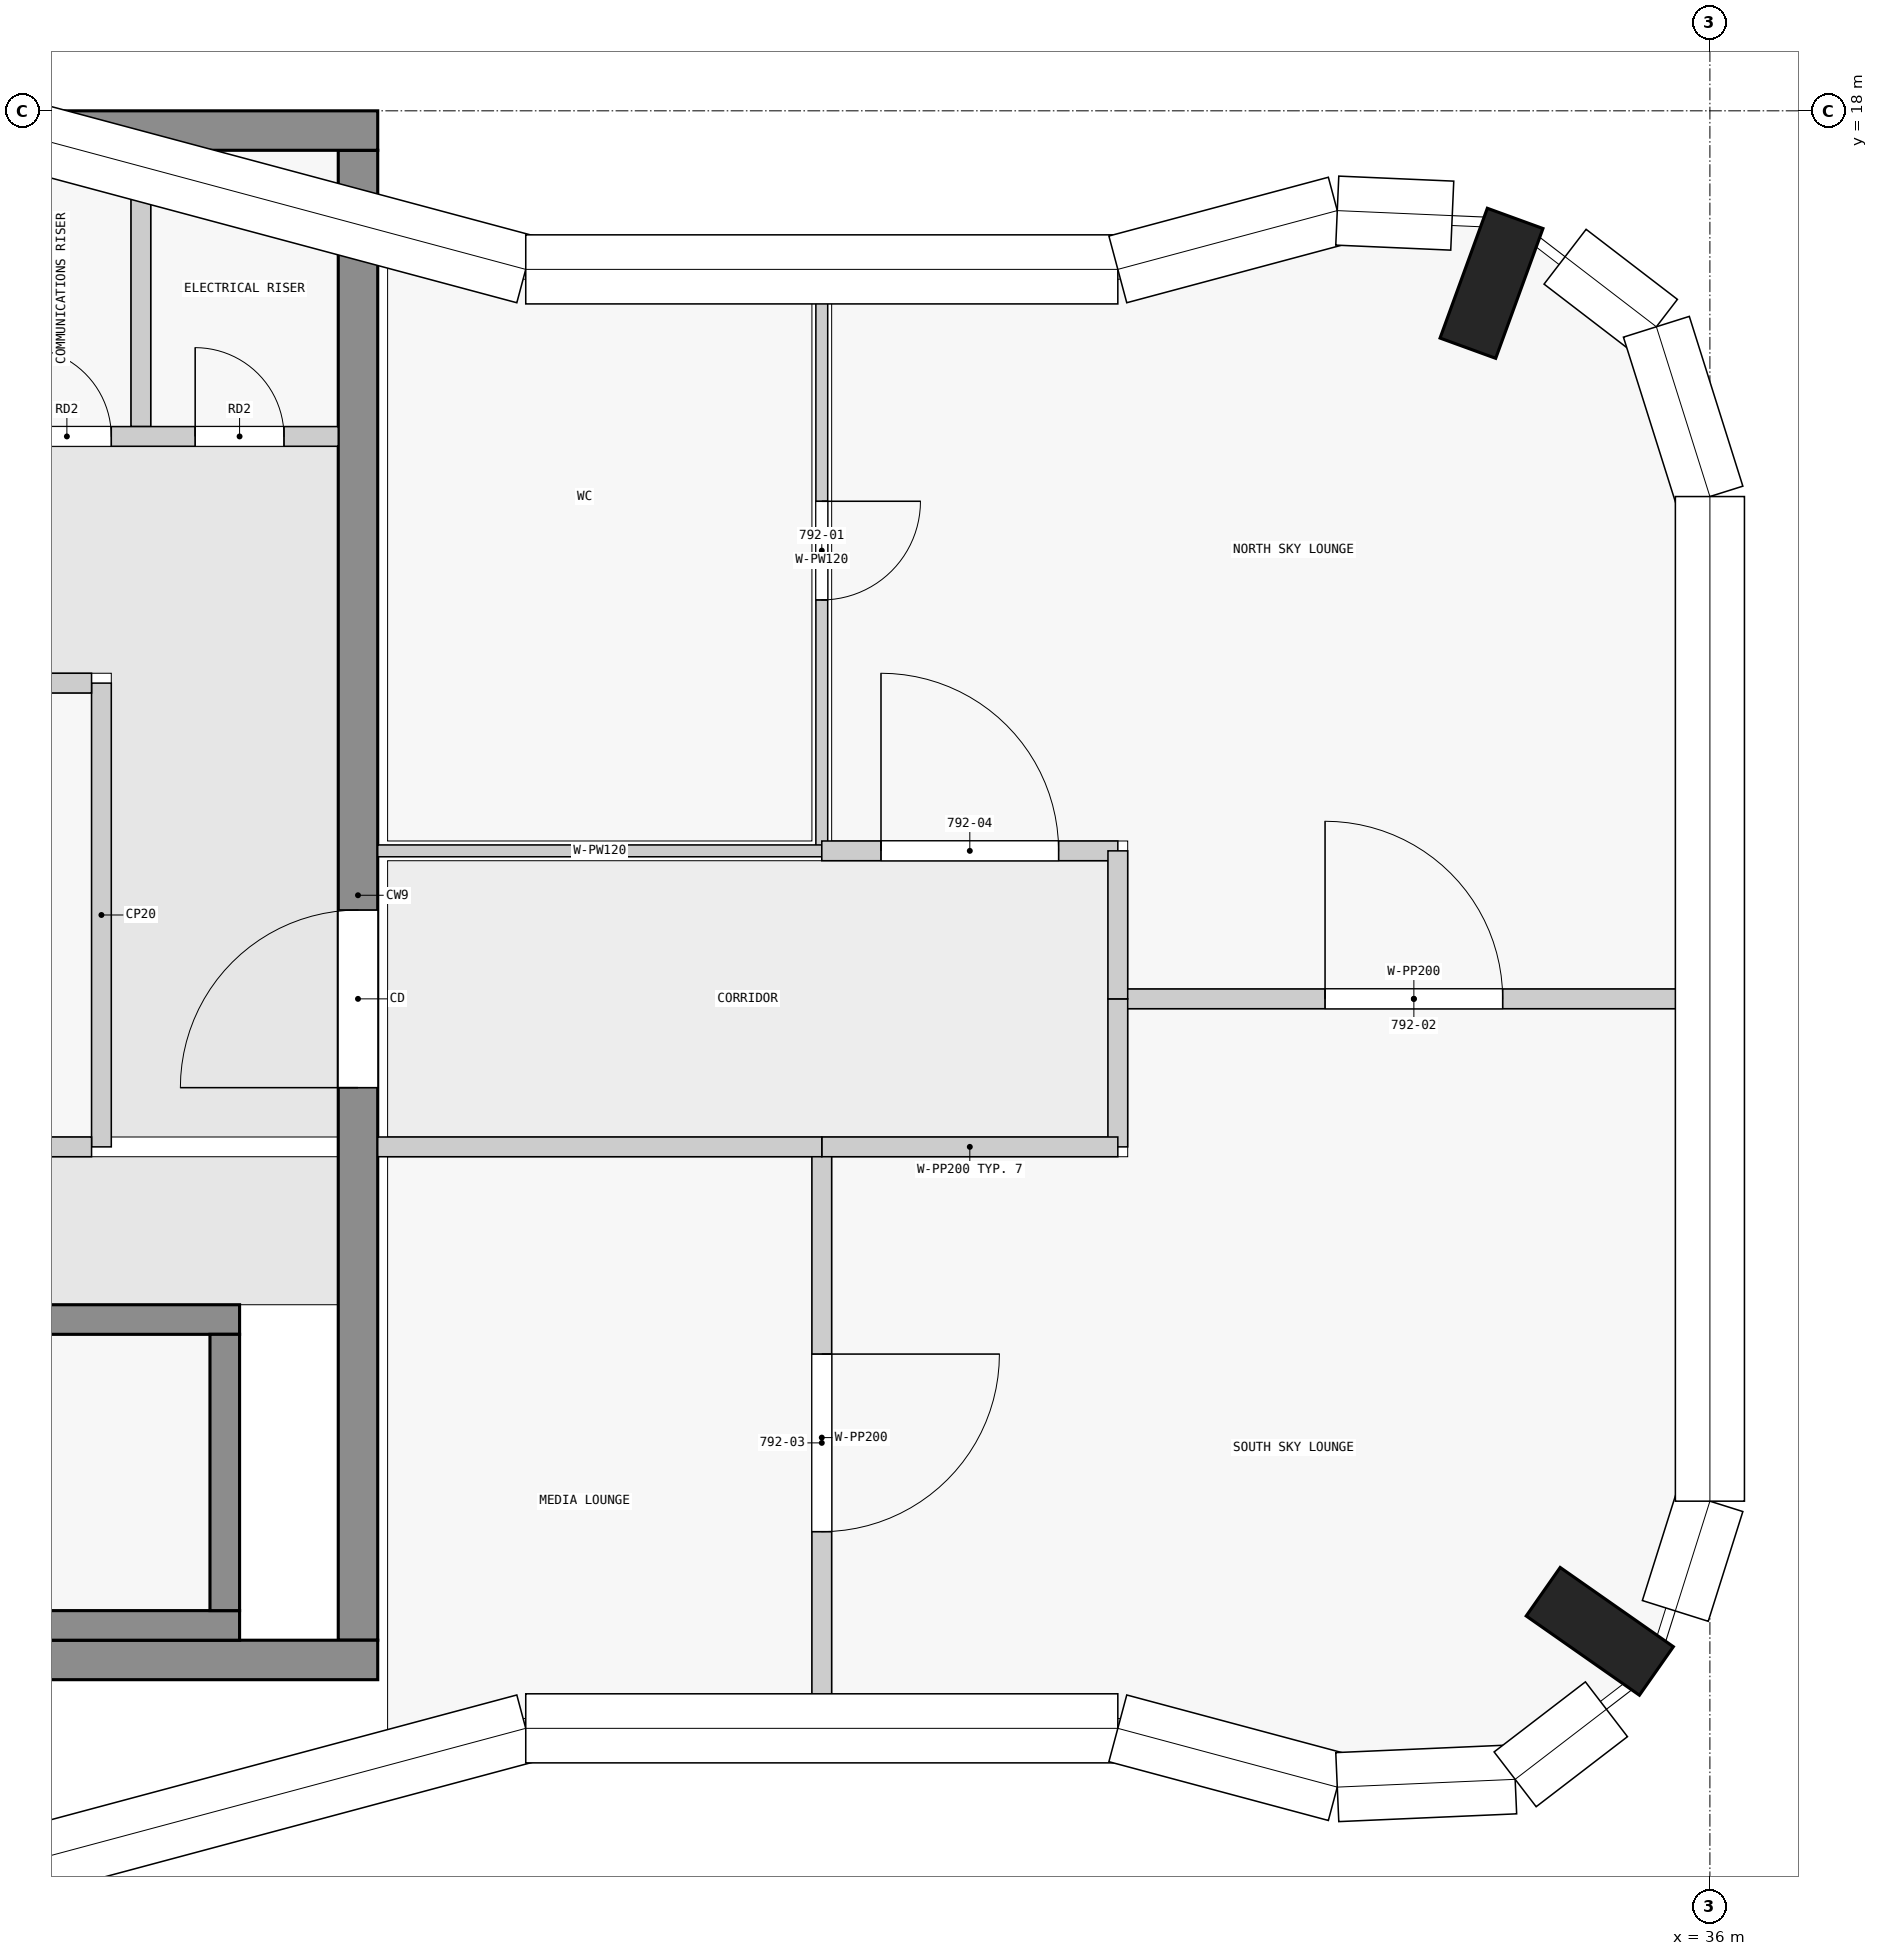
"""IFC4 building model, lengths in metres.
Left out: names, types, materials, properties, quantities, classifications, styles, units other than length and angle.
Written with IfcOpenShell. Run it as: python <this file> out.ifc"""

import sys

from ifc_helpers import new_model, si_unit, direction, frame, frame_2d, origin, origin_2d, place, context, subcontext, project, spatial, rectangle, extrude, element, fill, save


model = new_model("IFC4")
c1 = context("Model", 3, precision=1e-05, world=origin(), true_north=direction((0.0, 1.0)))
c2 = subcontext(c1, "Body", "Model", "MODEL_VIEW")
j1 = project(units=[si_unit("LENGTHUNIT", "METRE"), si_unit("PLANEANGLEUNIT", "RADIAN")], contexts=[c1])
p1 = place(None, origin())
s1 = spatial("IfcSite", under=j1, at=p1, CompositionType="ELEMENT")
p2 = place(p1, origin())
s2 = spatial("IfcBuilding", under=s1, at=p2, CompositionType="ELEMENT")
p3 = place(p2, frame((0.0, 0.0, 298.4)))
s3 = spatial("IfcBuildingStorey", under=s2, at=p3, CompositionType="ELEMENT", Elevation=298.4)
for number, where, z_axis, x_axis in (
    (1, (34.884, 2.59, 0.0), (0.0, 0.0, 1.0), (0.574, 0.819, 0.0)),
    (2, (33.787, 16.252, 0.0), (0.0, 0.0, 1.0), (-0.94, 0.342, 0.0)),
):
    element("IfcColumn", number, at=place(p3, frame(where, z_axis=z_axis, x_axis=x_axis)), inside=s3, PredefinedType="COLUMN", context=c2, shape_type="SweptSolid", body=[
        extrude(rectangle(XDim=0.6, YDim=1.4, at=origin_2d()), origin(), (0.0, 0.0, 1.0), 3.5),
    ])
for number, where, z_axis, x_axis in (
    (3, (1.9, 2.3, 0.0), (0.0, 0.0, 1.0), (1.0, 0.0, 0.0)),
    (4, (1.9, 17.8, 0.0), (0.0, 0.0, 1.0), (1.0, 0.0, 0.0)),
):
    element("IfcWall", number, at=place(p3, frame(where, z_axis=z_axis, x_axis=x_axis)), inside=s3, PredefinedType="SHEAR", context=c2, shape_type="SweptSolid", body=[
        extrude(rectangle(XDim=20.6, YDim=0.4, at=frame_2d((10.3, 0.0))), origin(), (0.0, 0.0, 1.0), 3.05),
    ])
p4 = place(p3, frame((22.3, 2.5, 0.0), z_axis=(0.0, 0.0, 1.0), x_axis=(0.0, 1.0, 0.0)))
e5 = element("IfcWall", 5, at=p4, inside=s3, PredefinedType="SHEAR", context=c2, shape_type="SweptSolid", body=[
    extrude(rectangle(XDim=15.1, YDim=0.4, at=frame_2d((7.55, 0.0))), origin(), (0.0, 0.0, 1.0), 3.05),
])
p5 = place(p4, frame((5.6, 0.0, 0.0)))
e6 = element("IfcOpeningElement", 6, at=p5, cuts=e5, PredefinedType="OPENING", context=c2, shape_type="SweptSolid", body=[
    extrude(rectangle(XDim=1.8, YDim=2.1, at=frame_2d((0.9, 1.05))), frame((0.0, 0.21, 0.0), z_axis=(0.0, -1.0, 0.0), x_axis=(1.0, 0.0, 0.0)), (0.0, 0.0, 1.0), 0.42),
])
p6 = place(p3, frame((13.3, 2.65, 0.0), z_axis=(0.0, 0.0, 1.0), x_axis=(1.0, 0.0, 0.0)))
e7 = element("IfcWall", 7, at=p6, inside=s3, PredefinedType="SHEAR", context=c2, shape_type="SweptSolid", body=[
    extrude(rectangle(XDim=7.8, YDim=0.3, at=frame_2d((3.9, 0.0))), origin(), (0.0, 0.0, 1.0), 3.05),
])
p7 = place(p3, frame((20.95, 2.8, 0.0), z_axis=(0.0, 0.0, 1.0), x_axis=(0.0, 1.0, 0.0)))
e8 = element("IfcWall", 8, at=p7, inside=s3, PredefinedType="SHEAR", context=c2, shape_type="SweptSolid", body=[
    extrude(rectangle(XDim=2.8, YDim=0.3, at=frame_2d((1.4, 0.0))), origin(), (0.0, 0.0, 1.0), 3.05),
])
p8 = place(p3, frame((2.3, 5.75, 0.0), z_axis=(0.0, 0.0, 1.0), x_axis=(1.0, 0.0, 0.0)))
e9 = element("IfcWall", 9, at=p8, inside=s3, PredefinedType="SHEAR", context=c2, shape_type="SweptSolid", body=[
    extrude(rectangle(XDim=18.8, YDim=0.3, at=frame_2d((9.4, 0.0))), origin(), (0.0, 0.0, 1.0), 3.05),
])
p9 = place(p8, frame((4.65, 0.0, 0.0)))
e10 = element("IfcOpeningElement", 10, at=p9, cuts=e9, PredefinedType="OPENING", context=c2, shape_type="SweptSolid", body=[
    extrude(rectangle(XDim=1.1, YDim=2.1, at=frame_2d((0.55, 1.05))), frame((0.0, 0.16, 0.0), z_axis=(0.0, -1.0, 0.0), x_axis=(1.0, 0.0, 0.0)), (0.0, 0.0, 1.0), 0.32),
])
p10 = place(p8, frame((0.45, 0.0, 0.0)))
e11 = element("IfcOpeningElement", 11, at=p10, cuts=e9, PredefinedType="OPENING", context=c2, shape_type="SweptSolid", body=[
    extrude(rectangle(XDim=1.1, YDim=2.1, at=frame_2d((0.55, 1.05))), frame((0.0, 0.16, 0.0), z_axis=(0.0, -1.0, 0.0), x_axis=(1.0, 0.0, 0.0)), (0.0, 0.0, 1.0), 0.32),
])
p11 = place(p8, frame((2.75, 0.0, 0.0)))
e12 = element("IfcOpeningElement", 12, at=p11, cuts=e9, PredefinedType="OPENING", context=c2, shape_type="SweptSolid", body=[
    extrude(rectangle(XDim=1.1, YDim=2.1, at=frame_2d((0.55, 1.05))), frame((0.0, 0.16, 0.0), z_axis=(0.0, -1.0, 0.0), x_axis=(1.0, 0.0, 0.0)), (0.0, 0.0, 1.0), 0.32),
])
p12 = place(p8, frame((11.95, 0.0, 0.0)))
e13 = element("IfcOpeningElement", 13, at=p12, cuts=e9, PredefinedType="OPENING", context=c2, shape_type="SweptSolid", body=[
    extrude(rectangle(XDim=0.9, YDim=2.1, at=frame_2d((0.45, 1.05))), frame((0.0, 0.16, 0.0), z_axis=(0.0, -1.0, 0.0), x_axis=(1.0, 0.0, 0.0)), (0.0, 0.0, 1.0), 0.32),
])
p13 = place(p8, frame((15.7, 0.0, 0.0)))
e14 = element("IfcOpeningElement", 14, at=p13, cuts=e9, PredefinedType="OPENING", context=c2, shape_type="SweptSolid", body=[
    extrude(rectangle(XDim=0.9, YDim=2.1, at=frame_2d((0.45, 1.05))), frame((0.0, 0.16, 0.0), z_axis=(0.0, -1.0, 0.0), x_axis=(1.0, 0.0, 0.0)), (0.0, 0.0, 1.0), 0.32),
])
p14 = place(p3, frame((10.9, 7.5, 0.0), z_axis=(0.0, 0.0, 1.0), x_axis=(1.0, 0.0, 0.0)))
e15 = element("IfcWall", 15, at=p14, inside=s3, PredefinedType="PARTITIONING", context=c2, shape_type="SweptSolid", body=[
    extrude(rectangle(XDim=8.7, YDim=0.2, at=frame_2d((4.35, 0.0))), origin(), (0.0, 0.0, 1.0), 3.05),
])
p15 = place(p3, frame((19.7, 7.5, 0.0), z_axis=(0.0, 0.0, 1.0), x_axis=(0.0, 1.0, 0.0)))
e16 = element("IfcWall", 16, at=p15, inside=s3, PredefinedType="PARTITIONING", context=c2, shape_type="SweptSolid", body=[
    extrude(rectangle(XDim=4.7, YDim=0.2, at=frame_2d((2.35, 0.0))), origin(), (0.0, 0.0, 1.0), 3.05),
])
p16 = place(p3, frame((10.9, 12.2, 0.0), z_axis=(0.0, 0.0, 1.0), x_axis=(1.0, 0.0, 0.0)))
e17 = element("IfcWall", 17, at=p16, inside=s3, PredefinedType="PARTITIONING", context=c2, shape_type="SweptSolid", body=[
    extrude(rectangle(XDim=8.7, YDim=0.2, at=frame_2d((4.35, 0.0))), origin(), (0.0, 0.0, 1.0), 3.05),
])
p17 = place(p16, frame((1.45, 0.0, 0.0)))
e18 = element("IfcOpeningElement", 18, at=p17, cuts=e17, PredefinedType="OPENING", context=c2, shape_type="SweptSolid", body=[
    extrude(rectangle(XDim=0.9, YDim=2.1, at=frame_2d((0.45, 1.05))), frame((0.0, 0.11, 0.0), z_axis=(0.0, -1.0, 0.0), x_axis=(1.0, 0.0, 0.0)), (0.0, 0.0, 1.0), 0.22),
])
p18 = place(p16, frame((5.9, 0.0, 0.0)))
e19 = element("IfcOpeningElement", 19, at=p18, cuts=e17, PredefinedType="OPENING", context=c2, shape_type="SweptSolid", body=[
    extrude(rectangle(XDim=0.9, YDim=2.1, at=frame_2d((0.45, 1.05))), frame((0.0, 0.11, 0.0), z_axis=(0.0, -1.0, 0.0), x_axis=(1.0, 0.0, 0.0)), (0.0, 0.0, 1.0), 0.22),
])
p19 = place(p3, frame((18.6, 14.7, 0.0), z_axis=(0.0, 0.0, 1.0), x_axis=(1.0, 0.0, 0.0)))
e20 = element("IfcWall", 20, at=p19, inside=s3, PredefinedType="PARTITIONING", context=c2, shape_type="SweptSolid", body=[
    extrude(rectangle(XDim=3.5, YDim=0.2, at=frame_2d((1.75, 0.0))), origin(), (0.0, 0.0, 1.0), 3.05),
])
p20 = place(p19, frame((0.3, 0.0, 0.0)))
e21 = element("IfcOpeningElement", 21, at=p20, cuts=e20, PredefinedType="OPENING", context=c2, shape_type="SweptSolid", body=[
    extrude(rectangle(XDim=0.9, YDim=2.1, at=frame_2d((0.45, 1.05))), frame((0.0, 0.11, 0.0), z_axis=(0.0, -1.0, 0.0), x_axis=(1.0, 0.0, 0.0)), (0.0, 0.0, 1.0), 0.22),
])
p21 = place(p19, frame((2.05, 0.0, 0.0)))
e22 = element("IfcOpeningElement", 22, at=p21, cuts=e20, PredefinedType="OPENING", context=c2, shape_type="SweptSolid", body=[
    extrude(rectangle(XDim=0.9, YDim=2.1, at=frame_2d((0.45, 1.05))), frame((0.0, 0.11, 0.0), z_axis=(0.0, -1.0, 0.0), x_axis=(1.0, 0.0, 0.0)), (0.0, 0.0, 1.0), 0.22),
])
p22 = place(p3, frame((20.1, 14.8, 0.0), z_axis=(0.0, 0.0, 1.0), x_axis=(0.0, 1.0, 0.0)))
e23 = element("IfcWall", 23, at=p22, inside=s3, PredefinedType="PARTITIONING", context=c2, shape_type="SweptSolid", body=[
    extrude(rectangle(XDim=2.8, YDim=0.2, at=frame_2d((1.4, 0.0))), origin(), (0.0, 0.0, 1.0), 3.05),
])
p23 = place(p3, frame((30.0, 9.0, 0.0), z_axis=(0.0, 0.0, 1.0), x_axis=(1.0, 0.0, 0.0)))
e24 = element("IfcWall", 24, at=p23, inside=s3, PredefinedType="PARTITIONING", context=c2, shape_type="SweptSolid", body=[
    extrude(rectangle(XDim=6.0, YDim=0.2, at=frame_2d((3.0, 0.0))), origin(), (0.0, 0.0, 1.0), 3.05),
])
p24 = place(p23, frame((2.1, 0.0, 0.0)))
e25 = element("IfcOpeningElement", 25, at=p24, cuts=e24, PredefinedType="OPENING", context=c2, shape_type="SweptSolid", body=[
    extrude(rectangle(XDim=1.8, YDim=2.1, at=frame_2d((0.9, 1.05))), frame((0.0, 0.11, 0.0), z_axis=(0.0, -1.0, 0.0), x_axis=(1.0, 0.0, 0.0)), (0.0, 0.0, 1.0), 0.22),
])
p25 = place(p3, frame((27.0, 16.393, 0.0), z_axis=(0.0, 0.0, 1.0), x_axis=(0.0, -1.0, 0.0)))
e26 = element("IfcWall", 26, at=p25, inside=s3, PredefinedType="PARTITIONING", context=c2, shape_type="SweptSolid", body=[
    extrude(rectangle(XDim=5.893, YDim=0.12, at=frame_2d((2.947, 0.0))), origin(), (0.0, 0.0, 1.0), 3.05),
])
p26 = place(p25, frame((2.35, 0.0, 0.0)))
e27 = element("IfcOpeningElement", 27, at=p26, cuts=e26, PredefinedType="OPENING", context=c2, shape_type="SweptSolid", body=[
    extrude(rectangle(XDim=1.0, YDim=2.1, at=frame_2d((0.5, 1.05))), frame((0.0, 0.07, 0.0), z_axis=(0.0, -1.0, 0.0), x_axis=(1.0, 0.0, 0.0)), (0.0, 0.0, 1.0), 0.14),
])
p27 = place(p3, frame((27.0, 7.5, 0.0), z_axis=(0.0, 0.0, 1.0), x_axis=(0.0, -1.0, 0.0)))
e28 = element("IfcWall", 28, at=p27, inside=s3, PredefinedType="PARTITIONING", context=c2, shape_type="SweptSolid", body=[
    extrude(rectangle(XDim=5.893, YDim=0.2, at=frame_2d((2.947, 0.0))), origin(), (0.0, 0.0, 1.0), 3.05),
])
p28 = place(p27, frame((2.1, 0.0, 0.0)))
e29 = element("IfcOpeningElement", 29, at=p28, cuts=e28, PredefinedType="OPENING", context=c2, shape_type="SweptSolid", body=[
    extrude(rectangle(XDim=1.8, YDim=2.1, at=frame_2d((0.9, 1.05))), frame((0.0, 0.11, 0.0), z_axis=(0.0, -1.0, 0.0), x_axis=(1.0, 0.0, 0.0)), (0.0, 0.0, 1.0), 0.22),
])
p29 = place(p3, frame((30.0, 9.0, 0.0), z_axis=(0.0, 0.0, 1.0), x_axis=(0.0, -1.0, 0.0)))
e30 = element("IfcWall", 30, at=p29, inside=s3, PredefinedType="PARTITIONING", context=c2, shape_type="SweptSolid", body=[
    extrude(rectangle(XDim=1.5, YDim=0.2, at=frame_2d((0.75, 0.0))), origin(), (0.0, 0.0, 1.0), 3.05),
])
p30 = place(p3, frame((30.0, 7.5, 0.0), z_axis=(0.0, 0.0, 1.0), x_axis=(-1.0, 0.0, 0.0)))
e31 = element("IfcWall", 31, at=p30, inside=s3, PredefinedType="PARTITIONING", context=c2, shape_type="SweptSolid", body=[
    extrude(rectangle(XDim=3.0, YDim=0.2, at=frame_2d((1.5, 0.0))), origin(), (0.0, 0.0, 1.0), 3.05),
])
p31 = place(p3, frame((22.5, 10.5, 0.0), z_axis=(0.0, 0.0, 1.0), x_axis=(1.0, 0.0, 0.0)))
e32 = element("IfcWall", 32, at=p31, inside=s3, PredefinedType="PARTITIONING", context=c2, shape_type="SweptSolid", body=[
    extrude(rectangle(XDim=4.5, YDim=0.12, at=frame_2d((2.25, 0.0))), origin(), (0.0, 0.0, 1.0), 3.05),
])
p32 = place(p3, frame((27.0, 7.5, 0.0), z_axis=(0.0, 0.0, 1.0), x_axis=(-1.0, 0.0, 0.0)))
e33 = element("IfcWall", 33, at=p32, inside=s3, PredefinedType="PARTITIONING", context=c2, shape_type="SweptSolid", body=[
    extrude(rectangle(XDim=4.5, YDim=0.2, at=frame_2d((2.25, 0.0))), origin(), (0.0, 0.0, 1.0), 3.05),
])
p33 = place(p3, frame((27.0, 10.5, 0.0), z_axis=(0.0, 0.0, 1.0), x_axis=(1.0, 0.0, 0.0)))
e34 = element("IfcWall", 34, at=p33, inside=s3, PredefinedType="PARTITIONING", context=c2, shape_type="SweptSolid", body=[
    extrude(rectangle(XDim=3.0, YDim=0.2, at=frame_2d((1.5, 0.0))), origin(), (0.0, 0.0, 1.0), 3.05),
])
p34 = place(p33, frame((0.6, 0.0, 0.0)))
e35 = element("IfcOpeningElement", 35, at=p34, cuts=e34, PredefinedType="OPENING", context=c2, shape_type="SweptSolid", body=[
    extrude(rectangle(XDim=1.8, YDim=2.1, at=frame_2d((0.9, 1.05))), frame((0.0, 0.11, 0.0), z_axis=(0.0, -1.0, 0.0), x_axis=(1.0, 0.0, 0.0)), (0.0, 0.0, 1.0), 0.22),
])
p35 = place(p3, frame((30.0, 10.5, 0.0), z_axis=(0.0, 0.0, 1.0), x_axis=(0.0, -1.0, 0.0)))
e36 = element("IfcWall", 36, at=p35, inside=s3, PredefinedType="PARTITIONING", context=c2, shape_type="SweptSolid", body=[
    extrude(rectangle(XDim=1.5, YDim=0.2, at=frame_2d((0.75, 0.0))), origin(), (0.0, 0.0, 1.0), 3.05),
])
p36 = place(p5, origin())
e37 = element("IfcDoor", 37, at=p36, inside=s3, OperationType="DOUBLE_DOOR_SINGLE_SWING", PredefinedType="DOOR", context=c2, shape_type="SweptSolid", body=[
    extrude(rectangle(XDim=1.8, YDim=2.1, at=frame_2d((0.9, 1.05))), frame((0.0, 0.025, 0.0), z_axis=(0.0, -1.0, 0.0), x_axis=(1.0, 0.0, 0.0)), (0.0, 0.0, 1.0), 0.05),
])
fill(e6, e37)
p37 = place(p20, origin())
e38 = element("IfcDoor", 38, at=p37, inside=s3, OperationType="SINGLE_SWING_LEFT", PredefinedType="DOOR", context=c2, shape_type="SweptSolid", body=[
    extrude(rectangle(XDim=0.9, YDim=2.1, at=frame_2d((0.45, 1.05))), frame((0.0, 0.025, 0.0), z_axis=(0.0, -1.0, 0.0), x_axis=(1.0, 0.0, 0.0)), (0.0, 0.0, 1.0), 0.05),
])
fill(e21, e38)
p38 = place(p21, origin())
e39 = element("IfcDoor", 39, at=p38, inside=s3, OperationType="SINGLE_SWING_LEFT", PredefinedType="DOOR", context=c2, shape_type="SweptSolid", body=[
    extrude(rectangle(XDim=0.9, YDim=2.1, at=frame_2d((0.45, 1.05))), frame((0.0, 0.025, 0.0), z_axis=(0.0, -1.0, 0.0), x_axis=(1.0, 0.0, 0.0)), (0.0, 0.0, 1.0), 0.05),
])
fill(e22, e39)
p39 = place(p26, origin())
e40 = element("IfcDoor", 40, at=p39, inside=s3, OperationType="SINGLE_SWING_LEFT", PredefinedType="DOOR", context=c2, shape_type="SweptSolid", body=[
    extrude(rectangle(XDim=1.0, YDim=2.1, at=frame_2d((0.5, 1.05))), frame((0.0, 0.025, 0.0), z_axis=(0.0, -1.0, 0.0), x_axis=(1.0, 0.0, 0.0)), (0.0, 0.0, 1.0), 0.05),
])
fill(e27, e40)
p40 = place(p24, origin())
e41 = element("IfcDoor", 41, at=p40, inside=s3, OperationType="DOUBLE_DOOR_SINGLE_SWING", PredefinedType="DOOR", context=c2, shape_type="SweptSolid", body=[
    extrude(rectangle(XDim=1.8, YDim=2.1, at=frame_2d((0.9, 1.05))), frame((0.0, 0.025, 0.0), z_axis=(0.0, -1.0, 0.0), x_axis=(1.0, 0.0, 0.0)), (0.0, 0.0, 1.0), 0.05),
])
fill(e25, e41)
p41 = place(p28, origin())
e42 = element("IfcDoor", 42, at=p41, inside=s3, OperationType="DOUBLE_DOOR_SINGLE_SWING", PredefinedType="DOOR", context=c2, shape_type="SweptSolid", body=[
    extrude(rectangle(XDim=1.8, YDim=2.1, at=frame_2d((0.9, 1.05))), frame((0.0, 0.025, 0.0), z_axis=(0.0, -1.0, 0.0), x_axis=(1.0, 0.0, 0.0)), (0.0, 0.0, 1.0), 0.05),
])
fill(e29, e42)
p42 = place(p34, origin())
e43 = element("IfcDoor", 43, at=p42, inside=s3, OperationType="DOUBLE_DOOR_SINGLE_SWING", PredefinedType="DOOR", context=c2, shape_type="SweptSolid", body=[
    extrude(rectangle(XDim=1.8, YDim=2.1, at=frame_2d((0.9, 1.05))), frame((0.0, 0.025, 0.0), z_axis=(0.0, -1.0, 0.0), x_axis=(1.0, 0.0, 0.0)), (0.0, 0.0, 1.0), 0.05),
])
fill(e35, e43)
save(model, sys.argv[1])
